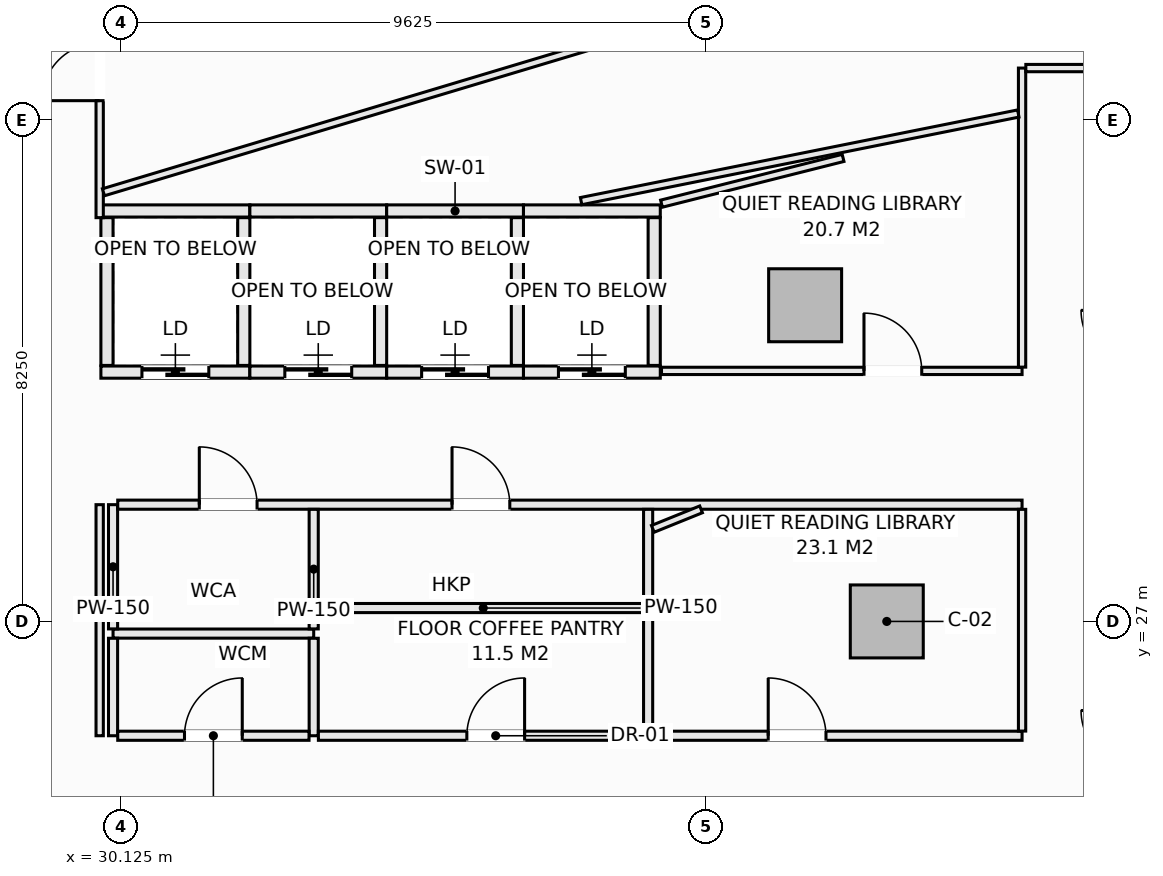
"""IFC4 building model, lengths in metres.
Left out: names, types, materials, properties, quantities, classifications, styles, units other than length and angle.
Written with IfcOpenShell. Run it as: python <this file> out.ifc"""

import sys

from ifc_helpers import new_model, si_unit, direction, frame, frame_2d, origin, origin_2d, place, context, subcontext, project, spatial, rectangle, extrude, element, fill, save


model = new_model("IFC4")
c1 = context("Model", 3, precision=1e-05, world=origin(), true_north=direction((0.0, 1.0)))
c2 = subcontext(c1, "Body", "Model", "MODEL_VIEW")
j1 = project(units=[si_unit("LENGTHUNIT", "METRE"), si_unit("PLANEANGLEUNIT", "RADIAN")], contexts=[c1])
p1 = place(None, origin())
s1 = spatial("IfcSite", under=j1, at=p1, CompositionType="ELEMENT")
p2 = place(p1, origin())
s2 = spatial("IfcBuilding", under=s1, at=p2, CompositionType="ELEMENT")
p3 = place(p2, frame((0.0, 0.0, 49.6)))
s3 = spatial("IfcBuildingStorey", under=s2, at=p3, CompositionType="ELEMENT", Elevation=49.6)
for number, where, z_axis, x_axis in (
    (1, (42.725, 27.0, -0.28), (0.0, 0.0, 1.0), (1.0, 0.0, 0.0)),
    (2, (41.382, 32.199, -0.28), (0.0, 0.0, 1.0), (1.0, 0.0, 0.0)),
):
    element("IfcColumn", number, at=place(p3, frame(where, z_axis=z_axis, x_axis=x_axis)), inside=s3, PredefinedType="COLUMN", context=c2, shape_type="SweptSolid", body=[
        extrude(rectangle(XDim=1.2, YDim=1.2, at=origin_2d()), origin(), (0.0, 0.0, 1.0), 3.85),
    ])
p4 = place(p3, frame((29.8, 33.75, 0.0), z_axis=(0.0, 0.0, 1.0), x_axis=(1.0, 0.0, 0.0)))
e3 = element("IfcWall", 3, at=p4, inside=s3, PredefinedType="SOLIDWALL", context=c2, shape_type="SweptSolid", body=[
    extrude(rectangle(XDim=2.45, YDim=0.2, at=frame_2d((1.225, 0.0))), origin(), (0.0, 0.0, 1.0), 3.57),
])
p5 = place(p3, frame((29.8, 31.1, 0.0), z_axis=(0.0, 0.0, 1.0), x_axis=(1.0, 0.0, 0.0)))
e4 = element("IfcWall", 4, at=p5, inside=s3, PredefinedType="SOLIDWALL", context=c2, shape_type="SweptSolid", body=[
    extrude(rectangle(XDim=2.45, YDim=0.2, at=frame_2d((1.225, 0.0))), origin(), (0.0, 0.0, 1.0), 3.57),
])
p6 = place(p5, frame((0.675, 0.0, 0.0)))
e5 = element("IfcOpeningElement", 5, at=p6, cuts=e4, PredefinedType="OPENING", context=c2, shape_type="SweptSolid", body=[
    extrude(rectangle(XDim=1.1, YDim=2.2, at=frame_2d((0.55, 1.1))), frame((0.0, 0.11, 0.0), z_axis=(0.0, -1.0, 0.0), x_axis=(1.0, 0.0, 0.0)), (0.0, 0.0, 1.0), 0.22),
])
for number, where, z_axis, x_axis in (
    (6, (29.9, 31.21, 0.0), (0.0, 0.0, 1.0), (0.0, 1.0, 0.0)),
    (7, (32.15, 31.21, 0.0), (0.0, 0.0, 1.0), (0.0, 1.0, 0.0)),
):
    element("IfcWall", number, at=place(p3, frame(where, z_axis=z_axis, x_axis=x_axis)), inside=s3, PredefinedType="SOLIDWALL", context=c2, shape_type="SweptSolid", body=[
        extrude(rectangle(XDim=2.43, YDim=0.2, at=frame_2d((1.215, 0.0))), origin(), (0.0, 0.0, 1.0), 3.57),
    ])
p7 = place(p3, frame((32.25, 33.75, 0.0), z_axis=(0.0, 0.0, 1.0), x_axis=(1.0, 0.0, 0.0)))
e8 = element("IfcWall", 8, at=p7, inside=s3, PredefinedType="SOLIDWALL", context=c2, shape_type="SweptSolid", body=[
    extrude(rectangle(XDim=2.25, YDim=0.2, at=frame_2d((1.125, 0.0))), origin(), (0.0, 0.0, 1.0), 3.57),
])
p8 = place(p3, frame((32.25, 31.1, 0.0), z_axis=(0.0, 0.0, 1.0), x_axis=(1.0, 0.0, 0.0)))
e9 = element("IfcWall", 9, at=p8, inside=s3, PredefinedType="SOLIDWALL", context=c2, shape_type="SweptSolid", body=[
    extrude(rectangle(XDim=2.25, YDim=0.2, at=frame_2d((1.125, 0.0))), origin(), (0.0, 0.0, 1.0), 3.57),
])
p9 = place(p8, frame((0.575, 0.0, 0.0)))
e10 = element("IfcOpeningElement", 10, at=p9, cuts=e9, PredefinedType="OPENING", context=c2, shape_type="SweptSolid", body=[
    extrude(rectangle(XDim=1.1, YDim=2.2, at=frame_2d((0.55, 1.1))), frame((0.0, 0.11, 0.0), z_axis=(0.0, -1.0, 0.0), x_axis=(1.0, 0.0, 0.0)), (0.0, 0.0, 1.0), 0.22),
])
p10 = place(p3, frame((34.4, 31.21, 0.0), z_axis=(0.0, 0.0, 1.0), x_axis=(0.0, 1.0, 0.0)))
e11 = element("IfcWall", 11, at=p10, inside=s3, PredefinedType="SOLIDWALL", context=c2, shape_type="SweptSolid", body=[
    extrude(rectangle(XDim=2.43, YDim=0.2, at=frame_2d((1.215, 0.0))), origin(), (0.0, 0.0, 1.0), 3.57),
])
p11 = place(p3, frame((34.5, 33.75, 0.0), z_axis=(0.0, 0.0, 1.0), x_axis=(1.0, 0.0, 0.0)))
e12 = element("IfcWall", 12, at=p11, inside=s3, PredefinedType="SOLIDWALL", context=c2, shape_type="SweptSolid", body=[
    extrude(rectangle(XDim=2.25, YDim=0.2, at=frame_2d((1.125, 0.0))), origin(), (0.0, 0.0, 1.0), 3.57),
])
p12 = place(p3, frame((34.5, 31.1, 0.0), z_axis=(0.0, 0.0, 1.0), x_axis=(1.0, 0.0, 0.0)))
e13 = element("IfcWall", 13, at=p12, inside=s3, PredefinedType="SOLIDWALL", context=c2, shape_type="SweptSolid", body=[
    extrude(rectangle(XDim=2.25, YDim=0.2, at=frame_2d((1.125, 0.0))), origin(), (0.0, 0.0, 1.0), 3.57),
])
p13 = place(p12, frame((0.575, 0.0, 0.0)))
e14 = element("IfcOpeningElement", 14, at=p13, cuts=e13, PredefinedType="OPENING", context=c2, shape_type="SweptSolid", body=[
    extrude(rectangle(XDim=1.1, YDim=2.2, at=frame_2d((0.55, 1.1))), frame((0.0, 0.11, 0.0), z_axis=(0.0, -1.0, 0.0), x_axis=(1.0, 0.0, 0.0)), (0.0, 0.0, 1.0), 0.22),
])
p14 = place(p3, frame((36.65, 31.21, 0.0), z_axis=(0.0, 0.0, 1.0), x_axis=(0.0, 1.0, 0.0)))
e15 = element("IfcWall", 15, at=p14, inside=s3, PredefinedType="SOLIDWALL", context=c2, shape_type="SweptSolid", body=[
    extrude(rectangle(XDim=2.43, YDim=0.2, at=frame_2d((1.215, 0.0))), origin(), (0.0, 0.0, 1.0), 3.57),
])
p15 = place(p3, frame((36.75, 33.75, 0.0), z_axis=(0.0, 0.0, 1.0), x_axis=(1.0, 0.0, 0.0)))
e16 = element("IfcWall", 16, at=p15, inside=s3, PredefinedType="SOLIDWALL", context=c2, shape_type="SweptSolid", body=[
    extrude(rectangle(XDim=2.25, YDim=0.2, at=frame_2d((1.125, 0.0))), origin(), (0.0, 0.0, 1.0), 3.57),
])
p16 = place(p3, frame((36.75, 31.1, 0.0), z_axis=(0.0, 0.0, 1.0), x_axis=(1.0, 0.0, 0.0)))
e17 = element("IfcWall", 17, at=p16, inside=s3, PredefinedType="SOLIDWALL", context=c2, shape_type="SweptSolid", body=[
    extrude(rectangle(XDim=2.25, YDim=0.2, at=frame_2d((1.125, 0.0))), origin(), (0.0, 0.0, 1.0), 3.57),
])
p17 = place(p16, frame((0.575, 0.0, 0.0)))
e18 = element("IfcOpeningElement", 18, at=p17, cuts=e17, PredefinedType="OPENING", context=c2, shape_type="SweptSolid", body=[
    extrude(rectangle(XDim=1.1, YDim=2.2, at=frame_2d((0.55, 1.1))), frame((0.0, 0.11, 0.0), z_axis=(0.0, -1.0, 0.0), x_axis=(1.0, 0.0, 0.0)), (0.0, 0.0, 1.0), 0.22),
])
p18 = place(p3, frame((38.9, 31.21, 0.0), z_axis=(0.0, 0.0, 1.0), x_axis=(0.0, 1.0, 0.0)))
e19 = element("IfcWall", 19, at=p18, inside=s3, PredefinedType="SOLIDWALL", context=c2, shape_type="SweptSolid", body=[
    extrude(rectangle(XDim=2.43, YDim=0.2, at=frame_2d((1.215, 0.0))), origin(), (0.0, 0.0, 1.0), 3.57),
])
p19 = place(p3, frame((30.0, 26.8, 0.0), z_axis=(0.0, 0.0, 1.0), x_axis=(1.0, 0.0, 0.0)))
e20 = element("IfcWall", 20, at=p19, inside=s3, PredefinedType="PARTITIONING", context=c2, shape_type="SweptSolid", body=[
    extrude(rectangle(XDim=3.3, YDim=0.15, at=frame_2d((1.65, 0.0))), origin(), (0.0, 0.0, 1.0), 3.57),
])
p20 = place(p3, frame((30.0, 25.12, 0.0), z_axis=(0.0, 0.0, 1.0), x_axis=(0.0, 1.0, 0.0)))
e21 = element("IfcWall", 21, at=p20, inside=s3, PredefinedType="PARTITIONING", context=c2, shape_type="SweptSolid", body=[
    extrude(rectangle(XDim=1.603, YDim=0.15, at=frame_2d((0.801, 0.0))), origin(), (0.0, 0.0, 1.0), 3.57),
])
p21 = place(p3, frame((30.0, 26.877, 0.0), z_axis=(0.0, 0.0, 1.0), x_axis=(0.0, 1.0, 0.0)))
e22 = element("IfcWall", 22, at=p21, inside=s3, PredefinedType="PARTITIONING", context=c2, shape_type="SweptSolid", body=[
    extrude(rectangle(XDim=2.043, YDim=0.15, at=frame_2d((1.021, 0.0))), origin(), (0.0, 0.0, 1.0), 3.57),
])
p22 = place(p3, frame((30.077, 28.92, 0.0), z_axis=(0.0, 0.0, 1.0), x_axis=(1.0, 0.0, 0.0)))
e23 = element("IfcWall", 23, at=p22, inside=s3, PredefinedType="PARTITIONING", context=c2, shape_type="SweptSolid", body=[
    extrude(rectangle(XDim=14.873, YDim=0.15, at=frame_2d((7.437, 0.0))), origin(), (0.0, 0.0, 1.0), 3.57),
])
p23 = place(p22, frame((1.342, 0.0, 0.0)))
e24 = element("IfcOpeningElement", 24, at=p23, cuts=e23, PredefinedType="OPENING", context=c2, shape_type="SweptSolid", body=[
    extrude(rectangle(XDim=0.95, YDim=2.1, at=frame_2d((0.475, 1.05))), frame((0.0, 0.085, 0.0), z_axis=(0.0, -1.0, 0.0), x_axis=(1.0, 0.0, 0.0)), (0.0, 0.0, 1.0), 0.17),
])
p24 = place(p22, frame((5.498, 0.0, 0.0)))
e25 = element("IfcOpeningElement", 25, at=p24, cuts=e23, PredefinedType="OPENING", context=c2, shape_type="SweptSolid", body=[
    extrude(rectangle(XDim=0.95, YDim=2.1, at=frame_2d((0.475, 1.05))), frame((0.0, 0.085, 0.0), z_axis=(0.0, -1.0, 0.0), x_axis=(1.0, 0.0, 0.0)), (0.0, 0.0, 1.0), 0.17),
])
p25 = place(p3, frame((33.3, 25.12, 0.0), z_axis=(0.0, 0.0, 1.0), x_axis=(0.0, 1.0, 0.0)))
e26 = element("IfcWall", 26, at=p25, inside=s3, PredefinedType="PARTITIONING", context=c2, shape_type="SweptSolid", body=[
    extrude(rectangle(XDim=1.603, YDim=0.15, at=frame_2d((0.801, 0.0))), origin(), (0.0, 0.0, 1.0), 3.57),
])
p26 = place(p3, frame((33.3, 26.877, 0.0), z_axis=(0.0, 0.0, 1.0), x_axis=(0.0, 1.0, 0.0)))
e27 = element("IfcWall", 27, at=p26, inside=s3, PredefinedType="PARTITIONING", context=c2, shape_type="SweptSolid", body=[
    extrude(rectangle(XDim=1.966, YDim=0.15, at=frame_2d((0.983, 0.0))), origin(), (0.0, 0.0, 1.0), 3.57),
])
p27 = place(p3, frame((30.077, 25.12, 0.0), z_axis=(0.0, 0.0, 1.0), x_axis=(1.0, 0.0, 0.0)))
e28 = element("IfcWall", 28, at=p27, inside=s3, PredefinedType="PARTITIONING", context=c2, shape_type="SweptSolid", body=[
    extrude(rectangle(XDim=3.146, YDim=0.15, at=frame_2d((1.573, 0.0))), origin(), (0.0, 0.0, 1.0), 3.57),
])
p28 = place(p27, frame((1.098, 0.0, 0.0)))
e29 = element("IfcOpeningElement", 29, at=p28, cuts=e28, PredefinedType="OPENING", context=c2, shape_type="SweptSolid", body=[
    extrude(rectangle(XDim=0.95, YDim=2.1, at=frame_2d((0.475, 1.05))), frame((0.0, 0.085, 0.0), z_axis=(0.0, -1.0, 0.0), x_axis=(1.0, 0.0, 0.0)), (0.0, 0.0, 1.0), 0.17),
])
p29 = place(p3, frame((33.377, 25.12, 0.0), z_axis=(0.0, 0.0, 1.0), x_axis=(1.0, 0.0, 0.0)))
e30 = element("IfcWall", 30, at=p29, inside=s3, PredefinedType="PARTITIONING", context=c2, shape_type="SweptSolid", body=[
    extrude(rectangle(XDim=11.573, YDim=0.15, at=frame_2d((5.787, 0.0))), origin(), (0.0, 0.0, 1.0), 3.57),
])
p30 = place(p29, frame((2.441, 0.0, 0.0)))
e31 = element("IfcOpeningElement", 31, at=p30, cuts=e30, PredefinedType="OPENING", context=c2, shape_type="SweptSolid", body=[
    extrude(rectangle(XDim=0.95, YDim=2.1, at=frame_2d((0.475, 1.05))), frame((0.0, 0.085, 0.0), z_axis=(0.0, -1.0, 0.0), x_axis=(1.0, 0.0, 0.0)), (0.0, 0.0, 1.0), 0.17),
])
p31 = place(p29, frame((7.398, 0.0, 0.0)))
e32 = element("IfcOpeningElement", 32, at=p31, cuts=e30, PredefinedType="OPENING", context=c2, shape_type="SweptSolid", body=[
    extrude(rectangle(XDim=0.95, YDim=2.1, at=frame_2d((0.475, 1.05))), frame((0.0, 0.085, 0.0), z_axis=(0.0, -1.0, 0.0), x_axis=(1.0, 0.0, 0.0)), (0.0, 0.0, 1.0), 0.17),
])
p32 = place(p3, frame((33.377, 27.22, 0.0), z_axis=(0.0, 0.0, 1.0), x_axis=(1.0, 0.0, 0.0)))
e33 = element("IfcWall", 33, at=p32, inside=s3, PredefinedType="PARTITIONING", context=c2, shape_type="SweptSolid", body=[
    extrude(rectangle(XDim=5.423, YDim=0.15, at=frame_2d((2.711, 0.0))), origin(), (0.0, 0.0, 1.0), 3.57),
])
p33 = place(p3, frame((38.8, 25.197, 0.0), z_axis=(0.0, 0.0, 1.0), x_axis=(0.0, 1.0, 0.0)))
e34 = element("IfcWall", 34, at=p33, inside=s3, PredefinedType="PARTITIONING", context=c2, shape_type="SweptSolid", body=[
    extrude(rectangle(XDim=1.946, YDim=0.15, at=frame_2d((0.973, 0.0))), origin(), (0.0, 0.0, 1.0), 3.57),
])
p34 = place(p3, frame((38.8, 27.297, 0.0), z_axis=(0.0, 0.0, 1.0), x_axis=(0.0, 1.0, 0.0)))
e35 = element("IfcWall", 35, at=p34, inside=s3, PredefinedType="PARTITIONING", context=c2, shape_type="SweptSolid", body=[
    extrude(rectangle(XDim=1.546, YDim=0.15, at=frame_2d((0.773, 0.0))), origin(), (0.0, 0.0, 1.0), 3.57),
])
p35 = place(p3, frame((29.78, 25.12, 0.0), z_axis=(0.0, 0.0, 1.0), x_axis=(0.0, 1.0, 0.0)))
e36 = element("IfcWall", 36, at=p35, inside=s3, PredefinedType="PARTITIONING", context=c2, shape_type="SweptSolid", body=[
    extrude(rectangle(XDim=3.8, YDim=0.12, at=frame_2d((1.9, 0.0))), origin(), (0.0, 0.0, 1.0), 3.57),
])
p36 = place(p3, frame((29.78, 33.64, 0.0), z_axis=(0.0, 0.0, 1.0), x_axis=(0.0, 1.0, 0.0)))
e37 = element("IfcWall", 37, at=p36, inside=s3, PredefinedType="PARTITIONING", context=c2, shape_type="SweptSolid", body=[
    extrude(rectangle(XDim=4.798, YDim=0.12, at=frame_2d((2.399, 0.0))), origin(), (0.0, 0.0, 1.0), 3.57),
])
p37 = place(p36, frame((1.924, 0.0, 0.0)))
e38 = element("IfcOpeningElement", 38, at=p37, cuts=e37, PredefinedType="OPENING", context=c2, shape_type="SweptSolid", body=[
    extrude(rectangle(XDim=0.95, YDim=2.1, at=frame_2d((0.475, 1.05))), frame((0.0, 0.07, 0.0), z_axis=(0.0, -1.0, 0.0), x_axis=(1.0, 0.0, 0.0)), (0.0, 0.0, 1.0), 0.14),
])
p38 = place(p3, frame((39.02, 31.12, 0.0), z_axis=(0.0, 0.0, 1.0), x_axis=(1.0, 0.0, 0.0)))
e39 = element("IfcWall", 39, at=p38, inside=s3, PredefinedType="PARTITIONING", context=c2, shape_type="SweptSolid", body=[
    extrude(rectangle(XDim=5.93, YDim=0.12, at=frame_2d((2.965, 0.0))), origin(), (0.0, 0.0, 1.0), 3.57),
])
p39 = place(p38, frame((3.33, 0.0, 0.0)))
e40 = element("IfcOpeningElement", 40, at=p39, cuts=e39, PredefinedType="OPENING", context=c2, shape_type="SweptSolid", body=[
    extrude(rectangle(XDim=0.95, YDim=2.1, at=frame_2d((0.475, 1.05))), frame((0.0, 0.07, 0.0), z_axis=(0.0, -1.0, 0.0), x_axis=(1.0, 0.0, 0.0)), (0.0, 0.0, 1.0), 0.14),
])
p40 = place(p3, frame((44.95, 25.197, 0.0), z_axis=(0.0, 0.0, 1.0), x_axis=(0.0, 1.0, 0.0)))
e41 = element("IfcWall", 41, at=p40, inside=s3, PredefinedType="PARTITIONING", context=c2, shape_type="SweptSolid", body=[
    extrude(rectangle(XDim=3.646, YDim=0.12, at=frame_2d((1.823, 0.0))), origin(), (0.0, 0.0, 1.0), 3.57),
])
p41 = place(p3, frame((44.95, 31.182, 0.0), z_axis=(0.0, 0.0, 1.0), x_axis=(0.0, 1.0, 0.0)))
e42 = element("IfcWall", 42, at=p41, inside=s3, PredefinedType="PARTITIONING", context=c2, shape_type="SweptSolid", body=[
    extrude(rectangle(XDim=4.918, YDim=0.12, at=frame_2d((2.459, 0.0))), origin(), (0.0, 0.0, 1.0), 3.57),
])
p42 = place(p3, frame((45.012, 36.1, 0.0), z_axis=(0.0, 0.0, 1.0), x_axis=(1.0, 0.0, 0.0)))
e43 = element("IfcWall", 43, at=p42, inside=s3, PredefinedType="PARTITIONING", context=c2, shape_type="SweptSolid", body=[
    extrude(rectangle(XDim=3.788, YDim=0.12, at=frame_2d((1.894, 0.0))), origin(), (0.0, 0.0, 1.0), 2.362),
])
p43 = place(p42, frame((1.419, 0.0, 0.0)))
e44 = element("IfcOpeningElement", 44, at=p43, cuts=e43, PredefinedType="OPENING", context=c2, shape_type="SweptSolid", body=[
    extrude(rectangle(XDim=0.95, YDim=2.1, at=frame_2d((0.475, 1.05))), frame((0.0, 0.07, 0.0), z_axis=(0.0, -1.0, 0.0), x_axis=(1.0, 0.0, 0.0)), (0.0, 0.0, 1.0), 0.14),
])
p44 = place(p3, frame((37.698, 33.912, 0.0), z_axis=(0.0, 0.0, 1.0), x_axis=(0.980510182708, 0.196468271245, 0.0)))
e45 = element("IfcWall", 45, at=p44, inside=s3, PredefinedType="PARTITIONING", context=c2, shape_type="SweptSolid", body=[
    extrude(rectangle(XDim=7.333, YDim=0.12, at=frame_2d((3.667, 0.0))), origin(), (0.0, 0.0, 1.0), 3.57),
])
p45 = place(p3, frame((38.877, 28.522, 0.0), z_axis=(0.0, 0.0, 1.0), x_axis=(0.927133255937, 0.374731805076, 0.0)))
e46 = element("IfcWall", 46, at=p45, inside=s3, PredefinedType="PARTITIONING", context=c2, shape_type="SweptSolid", body=[
    extrude(rectangle(XDim=0.856, YDim=0.12, at=frame_2d((0.428, 0.0))), origin(), (0.0, 0.0, 1.0), 3.57),
])
p46 = place(p3, frame((39.02, 33.87, 0.0), z_axis=(0.0, 0.0, 1.0), x_axis=(0.969711955751, 0.244251351837, 0.0)))
e47 = element("IfcWall", 47, at=p46, inside=s3, PredefinedType="PARTITIONING", context=c2, shape_type="SweptSolid", body=[
    extrude(rectangle(XDim=3.08, YDim=0.12, at=frame_2d((1.54, 0.0))), origin(), (0.0, 0.0, 1.0), 3.57),
])
p47 = place(p3, frame((29.842, 34.058, 0.0), z_axis=(0.0, 0.0, 1.0), x_axis=(0.957798094038, 0.287441839435, 0.0)))
e48 = element("IfcWall", 48, at=p47, inside=s3, PredefinedType="PARTITIONING", context=c2, shape_type="SweptSolid", body=[
    extrude(rectangle(XDim=21.217, YDim=0.12, at=frame_2d((10.608, 0.0))), origin(), (0.0, 0.0, 1.0), 3.205),
])
p48 = place(p6, origin())
e49 = element("IfcDoor", 49, at=p48, inside=s3, OperationType="SLIDING_TO_LEFT", PredefinedType="DOOR", context=c2, shape_type="SweptSolid", body=[
    extrude(rectangle(XDim=1.1, YDim=2.2, at=frame_2d((0.55, 1.1))), frame((0.0, 0.025, 0.0), z_axis=(0.0, -1.0, 0.0), x_axis=(1.0, 0.0, 0.0)), (0.0, 0.0, 1.0), 0.05),
])
fill(e5, e49)
p49 = place(p9, origin())
e50 = element("IfcDoor", 50, at=p49, inside=s3, OperationType="SLIDING_TO_LEFT", PredefinedType="DOOR", context=c2, shape_type="SweptSolid", body=[
    extrude(rectangle(XDim=1.1, YDim=2.2, at=frame_2d((0.55, 1.1))), frame((0.0, 0.025, 0.0), z_axis=(0.0, -1.0, 0.0), x_axis=(1.0, 0.0, 0.0)), (0.0, 0.0, 1.0), 0.05),
])
fill(e10, e50)
p50 = place(p13, origin())
e51 = element("IfcDoor", 51, at=p50, inside=s3, OperationType="SLIDING_TO_LEFT", PredefinedType="DOOR", context=c2, shape_type="SweptSolid", body=[
    extrude(rectangle(XDim=1.1, YDim=2.2, at=frame_2d((0.55, 1.1))), frame((0.0, 0.025, 0.0), z_axis=(0.0, -1.0, 0.0), x_axis=(1.0, 0.0, 0.0)), (0.0, 0.0, 1.0), 0.05),
])
fill(e14, e51)
p51 = place(p17, origin())
e52 = element("IfcDoor", 52, at=p51, inside=s3, OperationType="SLIDING_TO_LEFT", PredefinedType="DOOR", context=c2, shape_type="SweptSolid", body=[
    extrude(rectangle(XDim=1.1, YDim=2.2, at=frame_2d((0.55, 1.1))), frame((0.0, 0.025, 0.0), z_axis=(0.0, -1.0, 0.0), x_axis=(1.0, 0.0, 0.0)), (0.0, 0.0, 1.0), 0.05),
])
fill(e18, e52)
p52 = place(p23, origin())
e53 = element("IfcDoor", 53, at=p52, inside=s3, OperationType="SINGLE_SWING_LEFT", PredefinedType="DOOR", context=c2, shape_type="SweptSolid", body=[
    extrude(rectangle(XDim=0.95, YDim=2.1, at=frame_2d((0.475, 1.05))), frame((0.0, 0.025, 0.0), z_axis=(0.0, -1.0, 0.0), x_axis=(1.0, 0.0, 0.0)), (0.0, 0.0, 1.0), 0.05),
])
fill(e24, e53)
p53 = place(p28, origin())
e54 = element("IfcDoor", 54, at=p53, inside=s3, OperationType="SINGLE_SWING_RIGHT", PredefinedType="DOOR", context=c2, shape_type="SweptSolid", body=[
    extrude(rectangle(XDim=0.95, YDim=2.1, at=frame_2d((0.475, 1.05))), frame((0.0, 0.025, 0.0), z_axis=(0.0, -1.0, 0.0), x_axis=(1.0, 0.0, 0.0)), (0.0, 0.0, 1.0), 0.05),
])
fill(e29, e54)
p54 = place(p24, origin())
e55 = element("IfcDoor", 55, at=p54, inside=s3, OperationType="SINGLE_SWING_LEFT", PredefinedType="DOOR", context=c2, shape_type="SweptSolid", body=[
    extrude(rectangle(XDim=0.95, YDim=2.1, at=frame_2d((0.475, 1.05))), frame((0.0, 0.025, 0.0), z_axis=(0.0, -1.0, 0.0), x_axis=(1.0, 0.0, 0.0)), (0.0, 0.0, 1.0), 0.05),
])
fill(e25, e55)
p55 = place(p30, origin())
e56 = element("IfcDoor", 56, at=p55, inside=s3, OperationType="SINGLE_SWING_RIGHT", PredefinedType="DOOR", context=c2, shape_type="SweptSolid", body=[
    extrude(rectangle(XDim=0.95, YDim=2.1, at=frame_2d((0.475, 1.05))), frame((0.0, 0.025, 0.0), z_axis=(0.0, -1.0, 0.0), x_axis=(1.0, 0.0, 0.0)), (0.0, 0.0, 1.0), 0.05),
])
fill(e31, e56)
p56 = place(p31, origin())
e57 = element("IfcDoor", 57, at=p56, inside=s3, OperationType="SINGLE_SWING_LEFT", PredefinedType="DOOR", context=c2, shape_type="SweptSolid", body=[
    extrude(rectangle(XDim=0.95, YDim=2.1, at=frame_2d((0.475, 1.05))), frame((0.0, 0.025, 0.0), z_axis=(0.0, -1.0, 0.0), x_axis=(1.0, 0.0, 0.0)), (0.0, 0.0, 1.0), 0.05),
])
fill(e32, e57)
p57 = place(p39, origin())
e58 = element("IfcDoor", 58, at=p57, inside=s3, OperationType="SINGLE_SWING_LEFT", PredefinedType="DOOR", context=c2, shape_type="SweptSolid", body=[
    extrude(rectangle(XDim=0.95, YDim=2.1, at=frame_2d((0.475, 1.05))), frame((0.0, 0.025, 0.0), z_axis=(0.0, -1.0, 0.0), x_axis=(1.0, 0.0, 0.0)), (0.0, 0.0, 1.0), 0.05),
])
fill(e40, e58)
p58 = place(p37, origin())
e59 = element("IfcDoor", 59, at=p58, inside=s3, OperationType="SINGLE_SWING_LEFT", PredefinedType="DOOR", context=c2, shape_type="SweptSolid", body=[
    extrude(rectangle(XDim=0.95, YDim=2.1, at=frame_2d((0.475, 1.05))), frame((0.0, 0.025, 0.0), z_axis=(0.0, -1.0, 0.0), x_axis=(1.0, 0.0, 0.0)), (0.0, 0.0, 1.0), 0.05),
])
fill(e38, e59)
save(model, sys.argv[1])
